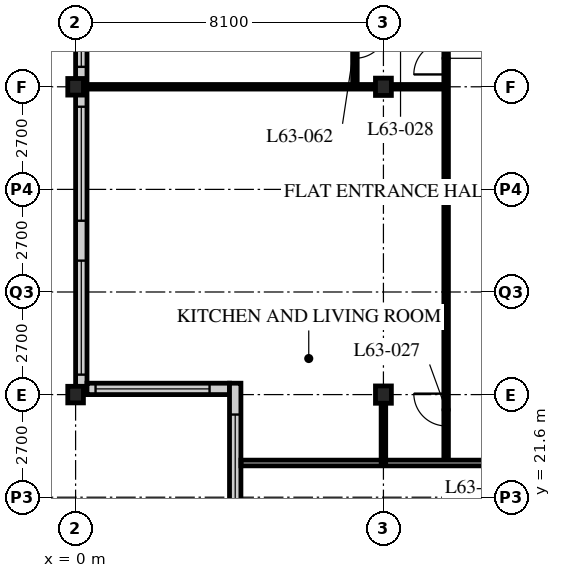
"""IFC4 building model, lengths in metres.
Left out: names, types, materials, properties, quantities, classifications, styles, units other than length and angle.
Written with IfcOpenShell. Run it as: python <this file> out.ifc"""

import sys

from ifc_helpers import new_model, si_unit, direction, frame, frame_2d, origin, origin_2d, place, context, subcontext, project, spatial, rectangle, i_section, extrude, element, fill, save


model = new_model("IFC4")
c1 = context("Model", 3, precision=1e-05, world=origin(), true_north=direction((0.0, 1.0)))
c2 = subcontext(c1, "Body", "Model", "MODEL_VIEW")
j1 = project(units=[si_unit("LENGTHUNIT", "METRE"), si_unit("PLANEANGLEUNIT", "RADIAN")], contexts=[c1])
p1 = place(None, origin())
s1 = spatial("IfcSite", under=j1, at=p1, CompositionType="ELEMENT")
p2 = place(p1, origin())
s2 = spatial("IfcBuilding", under=s1, at=p2, CompositionType="ELEMENT")
p3 = place(p2, frame((0.0, 0.0, 246.3)))
s3 = spatial("IfcBuildingStorey", under=s2, at=p3, CompositionType="ELEMENT", Elevation=246.3)
for number, where, z_axis, x_axis in (
    (1, (0.0, 24.3, 0.0), (0.0, 0.0, 1.0), (1.0, 0.0, 0.0)),
    (2, (0.0, 32.4, 0.0), (0.0, 0.0, 1.0), (1.0, 0.0, 0.0)),
):
    element("IfcColumn", number, at=place(p3, frame(where, z_axis=z_axis, x_axis=x_axis)), inside=s3, PredefinedType="COLUMN", context=c2, shape_type="SweptSolid", body=[
        extrude(i_section(OverallWidth=0.412, OverallDepth=0.437, WebThickness=0.036, FlangeThickness=0.058, FilletRadius=0.015, at=origin_2d()), origin(), (0.0, 0.0, 1.0), 3.9),
    ])
for number, where, z_axis, x_axis in (
    (3, (8.1, 24.3, 0.0), (0.0, 0.0, 1.0), (1.0, 0.0, 0.0)),
    (4, (8.1, 32.4, 0.0), (0.0, 0.0, 1.0), (1.0, 0.0, 0.0)),
):
    element("IfcColumn", number, at=place(p3, frame(where, z_axis=z_axis, x_axis=x_axis)), inside=s3, PredefinedType="COLUMN", context=c2, shape_type="SweptSolid", body=[
        extrude(i_section(OverallWidth=0.418, OverallDepth=0.456, WebThickness=0.042, FlangeThickness=0.067, FilletRadius=0.015, at=origin_2d()), origin(), (0.0, 0.0, 1.0), 3.9),
    ])
p4 = place(p3, frame((0.15, 56.4, 0.0), z_axis=(0.0, 0.0, 1.0), x_axis=(0.0, -1.0, 0.0)))
e5 = element("IfcWall", 5, at=p4, inside=s3, PredefinedType="SOLIDWALL", context=c2, shape_type="SweptSolid", body=[
    extrude(rectangle(XDim=32.1, YDim=0.3, at=frame_2d((16.05, 0.0))), origin(), (0.0, 0.0, 1.0), 3.69),
])
p5 = place(p4, frame((0.225, 0.0, 0.6)))
e6 = element("IfcOpeningElement", 6, at=p5, cuts=e5, PredefinedType="OPENING", context=c2, shape_type="SweptSolid", body=[
    extrude(rectangle(XDim=3.0, YDim=2.4, at=frame_2d((1.5, 1.2))), frame((0.0, 0.16, 0.0), z_axis=(0.0, -1.0, 0.0), x_axis=(1.0, 0.0, 0.0)), (0.0, 0.0, 1.0), 0.32),
])
p6 = place(p4, frame((4.275, 0.0, 0.6)))
e7 = element("IfcOpeningElement", 7, at=p6, cuts=e5, PredefinedType="OPENING", context=c2, shape_type="SweptSolid", body=[
    extrude(rectangle(XDim=3.0, YDim=2.4, at=frame_2d((1.5, 1.2))), frame((0.0, 0.16, 0.0), z_axis=(0.0, -1.0, 0.0), x_axis=(1.0, 0.0, 0.0)), (0.0, 0.0, 1.0), 0.32),
])
p7 = place(p4, frame((8.325, 0.0, 0.6)))
e8 = element("IfcOpeningElement", 8, at=p7, cuts=e5, PredefinedType="OPENING", context=c2, shape_type="SweptSolid", body=[
    extrude(rectangle(XDim=3.0, YDim=2.4, at=frame_2d((1.5, 1.2))), frame((0.0, 0.16, 0.0), z_axis=(0.0, -1.0, 0.0), x_axis=(1.0, 0.0, 0.0)), (0.0, 0.0, 1.0), 0.32),
])
p8 = place(p4, frame((12.375, 0.0, 0.6)))
e9 = element("IfcOpeningElement", 9, at=p8, cuts=e5, PredefinedType="OPENING", context=c2, shape_type="SweptSolid", body=[
    extrude(rectangle(XDim=3.0, YDim=2.4, at=frame_2d((1.5, 1.2))), frame((0.0, 0.16, 0.0), z_axis=(0.0, -1.0, 0.0), x_axis=(1.0, 0.0, 0.0)), (0.0, 0.0, 1.0), 0.32),
])
p9 = place(p4, frame((16.425, 0.0, 0.6)))
e10 = element("IfcOpeningElement", 10, at=p9, cuts=e5, PredefinedType="OPENING", context=c2, shape_type="SweptSolid", body=[
    extrude(rectangle(XDim=3.0, YDim=2.4, at=frame_2d((1.5, 1.2))), frame((0.0, 0.16, 0.0), z_axis=(0.0, -1.0, 0.0), x_axis=(1.0, 0.0, 0.0)), (0.0, 0.0, 1.0), 0.32),
])
p10 = place(p4, frame((20.475, 0.0, 0.6)))
e11 = element("IfcOpeningElement", 11, at=p10, cuts=e5, PredefinedType="OPENING", context=c2, shape_type="SweptSolid", body=[
    extrude(rectangle(XDim=3.0, YDim=2.4, at=frame_2d((1.5, 1.2))), frame((0.0, 0.16, 0.0), z_axis=(0.0, -1.0, 0.0), x_axis=(1.0, 0.0, 0.0)), (0.0, 0.0, 1.0), 0.32),
])
p11 = place(p4, frame((24.525, 0.0, 0.6)))
e12 = element("IfcOpeningElement", 12, at=p11, cuts=e5, PredefinedType="OPENING", context=c2, shape_type="SweptSolid", body=[
    extrude(rectangle(XDim=3.0, YDim=2.4, at=frame_2d((1.5, 1.2))), frame((0.0, 0.16, 0.0), z_axis=(0.0, -1.0, 0.0), x_axis=(1.0, 0.0, 0.0)), (0.0, 0.0, 1.0), 0.32),
])
p12 = place(p4, frame((28.575, 0.0, 0.6)))
e13 = element("IfcOpeningElement", 13, at=p12, cuts=e5, PredefinedType="OPENING", context=c2, shape_type="SweptSolid", body=[
    extrude(rectangle(XDim=3.0, YDim=2.4, at=frame_2d((1.5, 1.2))), frame((0.0, 0.16, 0.0), z_axis=(0.0, -1.0, 0.0), x_axis=(1.0, 0.0, 0.0)), (0.0, 0.0, 1.0), 0.32),
])
p13 = place(p3, frame((0.3, 24.45, 0.0), z_axis=(0.0, 0.0, 1.0), x_axis=(1.0, 0.0, 0.0)))
e14 = element("IfcWall", 14, at=p13, inside=s3, PredefinedType="SOLIDWALL", context=c2, shape_type="SweptSolid", body=[
    extrude(rectangle(XDim=3.75, YDim=0.3, at=frame_2d((1.875, 0.0))), origin(), (0.0, 0.0, 1.0), 3.69),
])
p14 = place(p13, frame((0.225, 0.0, 0.6)))
e15 = element("IfcOpeningElement", 15, at=p14, cuts=e14, PredefinedType="OPENING", context=c2, shape_type="SweptSolid", body=[
    extrude(rectangle(XDim=3.0, YDim=2.3, at=frame_2d((1.5, 1.15))), frame((0.0, 0.16, 0.0), z_axis=(0.0, -1.0, 0.0), x_axis=(1.0, 0.0, 0.0)), (0.0, 0.0, 1.0), 0.32),
])
p15 = place(p3, frame((4.2, 24.6, 0.0), z_axis=(0.0, 0.0, 1.0), x_axis=(0.0, -1.0, 0.0)))
e16 = element("IfcWall", 16, at=p15, inside=s3, PredefinedType="SOLIDWALL", context=c2, shape_type="SweptSolid", body=[
    extrude(rectangle(XDim=4.35, YDim=0.3, at=frame_2d((2.175, 0.0))), origin(), (0.0, 0.0, 1.0), 3.69),
])
p16 = place(p15, frame((0.825, 0.0, 0.6)))
e17 = element("IfcOpeningElement", 17, at=p16, cuts=e16, PredefinedType="OPENING", context=c2, shape_type="SweptSolid", body=[
    extrude(rectangle(XDim=3.0, YDim=2.3, at=frame_2d((1.5, 1.15))), frame((0.0, 0.16, 0.0), z_axis=(0.0, -1.0, 0.0), x_axis=(1.0, 0.0, 0.0)), (0.0, 0.0, 1.0), 0.32),
])
p17 = place(p3, frame((9.75, 22.5, 0.0), z_axis=(0.0, 0.0, 1.0), x_axis=(0.0, 1.0, 0.0)))
e18 = element("IfcWall", 18, at=p17, inside=s3, PredefinedType="PARTITIONING", context=c2, shape_type="SweptSolid", body=[
    extrude(rectangle(XDim=22.05, YDim=0.12, at=frame_2d((11.025, 0.0))), origin(), (0.0, 0.0, 1.0), 3.69),
])
p18 = place(p17, frame((0.975, 0.0, 0.0)))
e19 = element("IfcOpeningElement", 19, at=p18, cuts=e18, PredefinedType="OPENING", context=c2, shape_type="SweptSolid", body=[
    extrude(rectangle(XDim=0.85, YDim=2.1, at=frame_2d((0.425, 1.05))), frame((0.0, 0.07, 0.0), z_axis=(0.0, -1.0, 0.0), x_axis=(1.0, 0.0, 0.0)), (0.0, 0.0, 1.0), 0.14),
])
p19 = place(p17, frame((10.225, 0.0, 0.0)))
e20 = element("IfcOpeningElement", 20, at=p19, cuts=e18, PredefinedType="OPENING", context=c2, shape_type="SweptSolid", body=[
    extrude(rectangle(XDim=0.85, YDim=2.1, at=frame_2d((0.425, 1.05))), frame((0.0, 0.07, 0.0), z_axis=(0.0, -1.0, 0.0), x_axis=(1.0, 0.0, 0.0)), (0.0, 0.0, 1.0), 0.14),
])
p20 = place(p17, frame((14.275, 0.0, 0.0)))
e21 = element("IfcOpeningElement", 21, at=p20, cuts=e18, PredefinedType="OPENING", context=c2, shape_type="SweptSolid", body=[
    extrude(rectangle(XDim=0.85, YDim=2.1, at=frame_2d((0.425, 1.05))), frame((0.0, 0.07, 0.0), z_axis=(0.0, -1.0, 0.0), x_axis=(1.0, 0.0, 0.0)), (0.0, 0.0, 1.0), 0.14),
])
p21 = place(p17, frame((18.325, 0.0, 0.0)))
e22 = element("IfcOpeningElement", 22, at=p21, cuts=e18, PredefinedType="OPENING", context=c2, shape_type="SweptSolid", body=[
    extrude(rectangle(XDim=0.85, YDim=2.1, at=frame_2d((0.425, 1.05))), frame((0.0, 0.07, 0.0), z_axis=(0.0, -1.0, 0.0), x_axis=(1.0, 0.0, 0.0)), (0.0, 0.0, 1.0), 0.14),
])
p22 = place(p3, frame((9.75, 32.4, 0.0), z_axis=(0.0, 0.0, 1.0), x_axis=(-1.0, 0.0, 0.0)))
e23 = element("IfcWall", 23, at=p22, inside=s3, PredefinedType="PARTITIONING", context=c2, shape_type="SweptSolid", body=[
    extrude(rectangle(XDim=9.45, YDim=0.12, at=frame_2d((4.725, 0.0))), origin(), (0.0, 0.0, 1.0), 3.078),
])
p23 = place(p3, frame((4.35, 22.5, 0.0), z_axis=(0.0, 0.0, 1.0), x_axis=(1.0, 0.0, 0.0)))
e24 = element("IfcWall", 24, at=p23, inside=s3, PredefinedType="PARTITIONING", context=c2, shape_type="SweptSolid", body=[
    extrude(rectangle(XDim=7.8, YDim=0.15, at=frame_2d((3.9, 0.0))), origin(), (0.0, 0.0, 1.0), 3.69),
])
p24 = place(p3, frame((7.35, 32.4, 0.0), z_axis=(0.0, 0.0, 1.0), x_axis=(0.0, 1.0, 0.0)))
e25 = element("IfcWall", 25, at=p24, inside=s3, PredefinedType="PARTITIONING", context=c2, shape_type="SweptSolid", body=[
    extrude(rectangle(XDim=1.76, YDim=0.12, at=frame_2d((0.88, 0.0))), origin(), (0.0, 0.0, 1.0), 3.69),
])
p25 = place(p24, frame((0.75, 0.0, 0.0)))
e26 = element("IfcOpeningElement", 26, at=p25, cuts=e25, PredefinedType="OPENING", context=c2, shape_type="SweptSolid", body=[
    extrude(rectangle(XDim=0.85, YDim=2.1, at=frame_2d((0.425, 1.05))), frame((0.0, 0.07, 0.0), z_axis=(0.0, -1.0, 0.0), x_axis=(1.0, 0.0, 0.0)), (0.0, 0.0, 1.0), 0.14),
])
p26 = place(p3, frame((8.1, 22.5, 0.0), z_axis=(0.0, 0.0, 1.0), x_axis=(0.0, 1.0, 0.0)))
e27 = element("IfcWall", 27, at=p26, inside=s3, PredefinedType="PARTITIONING", context=c2, shape_type="SweptSolid", body=[
    extrude(rectangle(XDim=1.597, YDim=0.12, at=frame_2d((0.798, 0.0))), origin(), (0.0, 0.0, 1.0), 3.078),
])
p27 = place(p10, origin())
e28 = element("IfcWindow", 28, at=p27, inside=s3, PartitioningType="SINGLE_PANEL", PredefinedType="WINDOW", context=c2, shape_type="SweptSolid", body=[
    extrude(rectangle(XDim=3.0, YDim=2.4, at=frame_2d((1.5, 1.2))), frame((0.0, 0.03, 0.0), z_axis=(0.0, -1.0, 0.0), x_axis=(1.0, 0.0, 0.0)), (0.0, 0.0, 1.0), 0.06),
])
fill(e11, e28)
p28 = place(p11, origin())
e29 = element("IfcWindow", 29, at=p28, inside=s3, PartitioningType="SINGLE_PANEL", PredefinedType="WINDOW", context=c2, shape_type="SweptSolid", body=[
    extrude(rectangle(XDim=3.0, YDim=2.4, at=frame_2d((1.5, 1.2))), frame((0.0, 0.03, 0.0), z_axis=(0.0, -1.0, 0.0), x_axis=(1.0, 0.0, 0.0)), (0.0, 0.0, 1.0), 0.06),
])
fill(e12, e29)
p29 = place(p12, origin())
e30 = element("IfcWindow", 30, at=p29, inside=s3, PartitioningType="SINGLE_PANEL", PredefinedType="WINDOW", context=c2, shape_type="SweptSolid", body=[
    extrude(rectangle(XDim=3.0, YDim=2.4, at=frame_2d((1.5, 1.2))), frame((0.0, 0.03, 0.0), z_axis=(0.0, -1.0, 0.0), x_axis=(1.0, 0.0, 0.0)), (0.0, 0.0, 1.0), 0.06),
])
fill(e13, e30)
p30 = place(p14, origin())
e31 = element("IfcWindow", 31, at=p30, inside=s3, PartitioningType="SINGLE_PANEL", PredefinedType="WINDOW", context=c2, shape_type="SweptSolid", body=[
    extrude(rectangle(XDim=3.0, YDim=2.3, at=frame_2d((1.5, 1.15))), frame((0.0, 0.03, 0.0), z_axis=(0.0, -1.0, 0.0), x_axis=(1.0, 0.0, 0.0)), (0.0, 0.0, 1.0), 0.06),
])
fill(e15, e31)
p31 = place(p16, origin())
e32 = element("IfcWindow", 32, at=p31, inside=s3, PartitioningType="SINGLE_PANEL", PredefinedType="WINDOW", context=c2, shape_type="SweptSolid", body=[
    extrude(rectangle(XDim=3.0, YDim=2.3, at=frame_2d((1.5, 1.15))), frame((0.0, 0.03, 0.0), z_axis=(0.0, -1.0, 0.0), x_axis=(1.0, 0.0, 0.0)), (0.0, 0.0, 1.0), 0.06),
])
fill(e17, e32)
p32 = place(p18, origin())
e33 = element("IfcDoor", 33, at=p32, inside=s3, OperationType="SINGLE_SWING_RIGHT", PredefinedType="DOOR", context=c2, shape_type="SweptSolid", body=[
    extrude(rectangle(XDim=0.85, YDim=2.1, at=frame_2d((0.425, 1.05))), frame((0.0, 0.025, 0.0), z_axis=(0.0, -1.0, 0.0), x_axis=(1.0, 0.0, 0.0)), (0.0, 0.0, 1.0), 0.05),
])
fill(e19, e33)
p33 = place(p19, origin())
e34 = element("IfcDoor", 34, at=p33, inside=s3, OperationType="SINGLE_SWING_LEFT", PredefinedType="DOOR", context=c2, shape_type="SweptSolid", body=[
    extrude(rectangle(XDim=0.85, YDim=2.1, at=frame_2d((0.425, 1.05))), frame((0.0, 0.025, 0.0), z_axis=(0.0, -1.0, 0.0), x_axis=(1.0, 0.0, 0.0)), (0.0, 0.0, 1.0), 0.05),
])
fill(e20, e34)
p34 = place(p25, origin())
e35 = element("IfcDoor", 35, at=p34, inside=s3, OperationType="SINGLE_SWING_LEFT", PredefinedType="DOOR", context=c2, shape_type="SweptSolid", body=[
    extrude(rectangle(XDim=0.85, YDim=2.1, at=frame_2d((0.425, 1.05))), frame((0.0, 0.025, 0.0), z_axis=(0.0, -1.0, 0.0), x_axis=(1.0, 0.0, 0.0)), (0.0, 0.0, 1.0), 0.05),
])
fill(e26, e35)
save(model, sys.argv[1])
